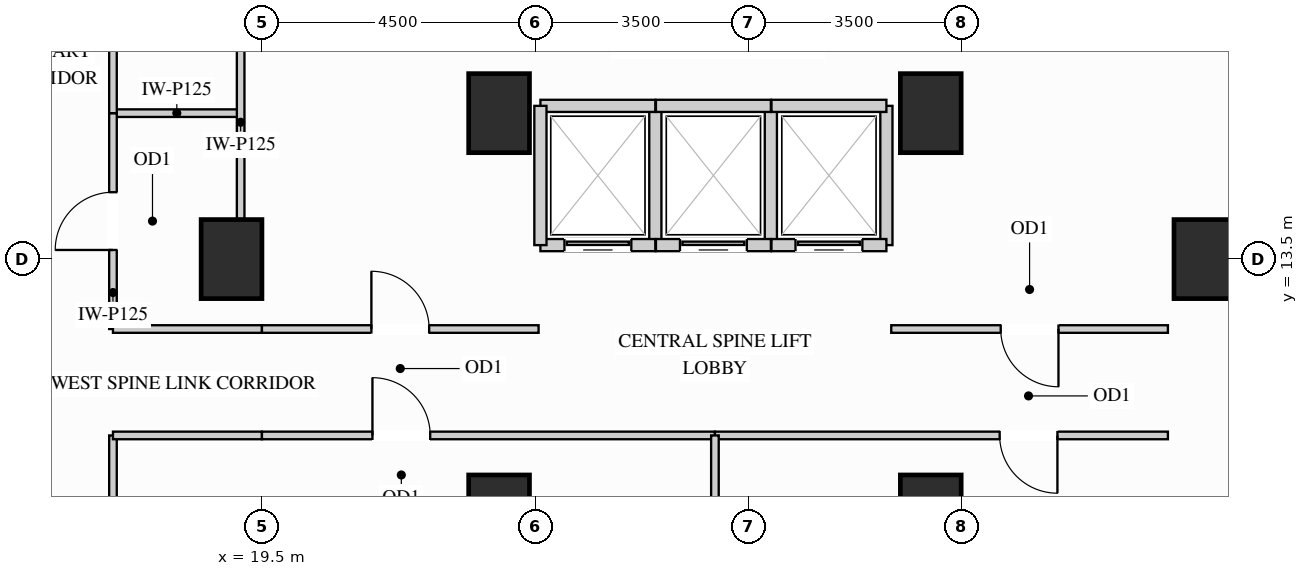
"""IFC4 building model, lengths in metres.
Left out: names, types, materials, properties, quantities, classifications, styles, units other than length and angle.
Written with IfcOpenShell. Run it as: python <this file> out.ifc"""

import sys

from ifc_helpers import new_model, si_unit, direction, frame, frame_2d, origin, origin_2d, place, context, subcontext, project, spatial, rectangle, extrude, source, transform, mapped, element, fill, save


model = new_model("IFC4")
c1 = context("Model", 3, precision=1e-05, world=origin(), true_north=direction((0.0, 1.0)))
c2 = subcontext(c1, "Body", "Model", "MODEL_VIEW")
j1 = project(units=[si_unit("LENGTHUNIT", "METRE"), si_unit("PLANEANGLEUNIT", "RADIAN")], contexts=[c1])
p1 = place(None, origin())
s1 = spatial("IfcSite", under=j1, at=p1, CompositionType="ELEMENT")
p2 = place(p1, origin())
s2 = spatial("IfcBuilding", under=s1, at=p2, CompositionType="ELEMENT")
p3 = place(p2, frame((0.0, 0.0, 40.5)))
s3 = spatial("IfcBuildingStorey", under=s2, at=p3, CompositionType="ELEMENT", Elevation=40.5)
m1 = source(origin(), c2, "Body", "SweptSolid", [
    extrude(rectangle(XDim=1.0, YDim=1.3, at=origin_2d()), origin(), (0.0, 0.0, 1.0), 3.38),
])
for number, where, z_axis, x_axis in (
    (1, (19.0, 13.5, 0.0), (0.0, 0.0, 1.0), (1.0, 0.0, 0.0)),
    (2, (35.0, 13.5, 0.0), (0.0, 0.0, 1.0), (1.0, 0.0, 0.0)),
    (3, (23.4, 15.9, 0.0), (0.0, 0.0, 1.0), (1.0, 0.0, 0.0)),
    (4, (23.4, 9.3, 0.0), (0.0, 0.0, 1.0), (1.0, 0.0, 0.0)),
    (5, (30.5, 15.9, 0.0), (0.0, 0.0, 1.0), (1.0, 0.0, 0.0)),
    (6, (30.5, 9.3, 0.0), (0.0, 0.0, 1.0), (1.0, 0.0, 0.0)),
):
    element("IfcColumn", number, at=place(p3, frame(where, z_axis=z_axis, x_axis=x_axis)), inside=s3, PredefinedType="COLUMN", context=c2, shape_type="MappedRepresentation", body=[
        mapped(m1, transform((0.0, 0.0, 0.0), x_axis=(1.0, 0.0, 0.0), y_axis=(0.0, 1.0, 0.0), z_axis=(0.0, 0.0, 1.0))),
    ])
m2 = source(origin(), c2, "Body", "SweptSolid", [
    extrude(rectangle(XDim=2.1, YDim=0.125, at=frame_2d((1.05, 0.0))), origin(), (0.0, 0.0, 1.0), 3.365),
])
p4 = place(p3, frame((17.05, 15.9, 0.0), z_axis=(0.0, 0.0, 1.0), x_axis=(1.0, 0.0, 0.0)))
e7 = element("IfcWall", 7, at=p4, inside=s3, PredefinedType="PARTITIONING", context=c2, shape_type="MappedRepresentation", body=[
    mapped(m2, transform((0.0, 0.0, 0.0), x_axis=(1.0, 0.0, 0.0), y_axis=(0.0, 1.0, 0.0), z_axis=(0.0, 0.0, 1.0))),
])
m3 = source(origin(), c2, "Body", "SweptSolid", [
    extrude(rectangle(XDim=3.18, YDim=0.125, at=frame_2d((1.59, 0.0))), origin(), (0.0, 0.0, 1.0), 2.67),
])
p5 = place(p3, frame((19.15, 14.16, 0.0), z_axis=(0.0, 0.0, 1.0), x_axis=(0.0, 1.0, 0.0)))
e8 = element("IfcWall", 8, at=p5, inside=s3, PredefinedType="PARTITIONING", context=c2, shape_type="MappedRepresentation", body=[
    mapped(m3, transform((0.0, 0.0, 0.0), x_axis=(1.0, 0.0, 0.0), y_axis=(0.0, 1.0, 0.0), z_axis=(0.0, 0.0, 1.0))),
])
p6 = place(p3, frame((17.05, 12.35, 0.0), z_axis=(0.0, 0.0, 1.0), x_axis=(0.0, 1.0, 0.0)))
e9 = element("IfcWall", 9, at=p6, inside=s3, PredefinedType="PARTITIONING", context=c2, shape_type="SweptSolid", body=[
    extrude(rectangle(XDim=3.55, YDim=0.125, at=frame_2d((1.775, 0.0))), origin(), (0.0, 0.0, 1.0), 3.365),
])
p7 = place(p6, frame((1.3, 0.0, 0.0)))
e10 = element("IfcOpeningElement", 10, at=p7, cuts=e9, PredefinedType="OPENING", context=c2, shape_type="SweptSolid", body=[
    extrude(rectangle(XDim=0.95, YDim=2.15, at=frame_2d((0.475, 1.075))), frame((0.0, 0.073, 0.0), z_axis=(0.0, -1.0, 0.0), x_axis=(1.0, 0.0, 0.0)), (0.0, 0.0, 1.0), 0.145),
])
p8 = place(p3, frame((17.05, 15.9, 0.0), z_axis=(0.0, 0.0, 1.0), x_axis=(0.0, 1.0, 0.0)))
e11 = element("IfcWall", 11, at=p8, inside=s3, PredefinedType="PARTITIONING", context=c2, shape_type="SweptSolid", body=[
    extrude(rectangle(XDim=7.45, YDim=0.125, at=frame_2d((3.725, 0.0))), origin(), (0.0, 0.0, 1.0), 3.365),
])
p9 = place(p8, frame((3.25, 0.0, 0.0)))
e12 = element("IfcOpeningElement", 12, at=p9, cuts=e11, PredefinedType="OPENING", context=c2, shape_type="SweptSolid", body=[
    extrude(rectangle(XDim=0.95, YDim=2.15, at=frame_2d((0.475, 1.075))), frame((0.0, 0.073, 0.0), z_axis=(0.0, -1.0, 0.0), x_axis=(1.0, 0.0, 0.0)), (0.0, 0.0, 1.0), 0.145),
])
p10 = place(p3, frame((17.05, 6.15, 0.0), z_axis=(0.0, 0.0, 1.0), x_axis=(0.0, 1.0, 0.0)))
e13 = element("IfcWall", 13, at=p10, inside=s3, PredefinedType="PARTITIONING", context=c2, shape_type="SweptSolid", body=[
    extrude(rectangle(XDim=4.45, YDim=0.125, at=frame_2d((2.225, 0.0))), origin(), (0.0, 0.0, 1.0), 3.365),
])
p11 = place(p10, frame((1.75, 0.0, 0.0)))
e14 = element("IfcOpeningElement", 14, at=p11, cuts=e13, PredefinedType="OPENING", context=c2, shape_type="SweptSolid", body=[
    extrude(rectangle(XDim=0.95, YDim=2.15, at=frame_2d((0.475, 1.075))), frame((0.0, 0.073, 0.0), z_axis=(0.0, -1.0, 0.0), x_axis=(1.0, 0.0, 0.0)), (0.0, 0.0, 1.0), 0.145),
])
p12 = place(p3, frame((29.85, 12.35, 0.0), z_axis=(0.0, 0.0, 1.0), x_axis=(1.0, 0.0, 0.0)))
e15 = element("IfcWall", 15, at=p12, inside=s3, PredefinedType="PARTITIONING", context=c2, shape_type="SweptSolid", body=[
    extrude(rectangle(XDim=4.55, YDim=0.125, at=frame_2d((2.275, 0.0))), origin(), (0.0, 0.0, 1.0), 3.365),
])
p13 = place(p12, frame((1.8, 0.0, 0.0)))
e16 = element("IfcOpeningElement", 16, at=p13, cuts=e15, PredefinedType="OPENING", context=c2, shape_type="SweptSolid", body=[
    extrude(rectangle(XDim=0.95, YDim=2.15, at=frame_2d((0.475, 1.075))), frame((0.0, 0.073, 0.0), z_axis=(0.0, -1.0, 0.0), x_axis=(1.0, 0.0, 0.0)), (0.0, 0.0, 1.0), 0.145),
])
m4 = source(origin(), c2, "Body", "SweptSolid", [
    extrude(rectangle(XDim=2.45, YDim=0.125, at=frame_2d((1.225, 0.0))), origin(), (0.0, 0.0, 1.0), 3.365),
])
p14 = place(p3, frame((17.05, 12.35, 0.0), z_axis=(0.0, 0.0, 1.0), x_axis=(1.0, 0.0, 0.0)))
e17 = element("IfcWall", 17, at=p14, inside=s3, PredefinedType="PARTITIONING", context=c2, shape_type="MappedRepresentation", body=[
    mapped(m4, transform((0.0, 0.0, 0.0), x_axis=(1.0, 0.0, 0.0), y_axis=(0.0, 1.0, 0.0), z_axis=(0.0, 0.0, 1.0))),
])
p15 = place(p3, frame((19.5, 12.35, 0.0), z_axis=(0.0, 0.0, 1.0), x_axis=(1.0, 0.0, 0.0)))
e18 = element("IfcWall", 18, at=p15, inside=s3, PredefinedType="PARTITIONING", context=c2, shape_type="SweptSolid", body=[
    extrude(rectangle(XDim=4.55, YDim=0.125, at=frame_2d((2.275, 0.0))), origin(), (0.0, 0.0, 1.0), 3.365),
])
p16 = place(p15, frame((1.8, 0.0, 0.0)))
e19 = element("IfcOpeningElement", 19, at=p16, cuts=e18, PredefinedType="OPENING", context=c2, shape_type="SweptSolid", body=[
    extrude(rectangle(XDim=0.95, YDim=2.15, at=frame_2d((0.475, 1.075))), frame((0.0, 0.073, 0.0), z_axis=(0.0, -1.0, 0.0), x_axis=(1.0, 0.0, 0.0)), (0.0, 0.0, 1.0), 0.145),
])
p17 = place(p3, frame((17.05, 10.6, 0.0), z_axis=(0.0, 0.0, 1.0), x_axis=(1.0, 0.0, 0.0)))
e20 = element("IfcWall", 20, at=p17, inside=s3, PredefinedType="PARTITIONING", context=c2, shape_type="MappedRepresentation", body=[
    mapped(m4, transform((0.0, 0.0, 0.0), x_axis=(1.0, 0.0, 0.0), y_axis=(0.0, 1.0, 0.0), z_axis=(0.0, 0.0, 1.0))),
])
p18 = place(p3, frame((19.5, 10.6, 0.0), z_axis=(0.0, 0.0, 1.0), x_axis=(1.0, 0.0, 0.0)))
e21 = element("IfcWall", 21, at=p18, inside=s3, PredefinedType="PARTITIONING", context=c2, shape_type="SweptSolid", body=[
    extrude(rectangle(XDim=7.45, YDim=0.125, at=frame_2d((3.725, 0.0))), origin(), (0.0, 0.0, 1.0), 3.365),
])
p19 = place(p18, frame((1.817, 0.0, 0.0)))
e22 = element("IfcOpeningElement", 22, at=p19, cuts=e21, PredefinedType="OPENING", context=c2, shape_type="SweptSolid", body=[
    extrude(rectangle(XDim=0.95, YDim=2.15, at=frame_2d((0.475, 1.075))), frame((0.0, 0.073, 0.0), z_axis=(0.0, -1.0, 0.0), x_axis=(1.0, 0.0, 0.0)), (0.0, 0.0, 1.0), 0.145),
])
p20 = place(p3, frame((26.95, 10.6, 0.0), z_axis=(0.0, 0.0, 1.0), x_axis=(1.0, 0.0, 0.0)))
e23 = element("IfcWall", 23, at=p20, inside=s3, PredefinedType="PARTITIONING", context=c2, shape_type="SweptSolid", body=[
    extrude(rectangle(XDim=7.45, YDim=0.125, at=frame_2d((3.725, 0.0))), origin(), (0.0, 0.0, 1.0), 3.365),
])
p21 = place(p20, frame((4.683, 0.0, 0.0)))
e24 = element("IfcOpeningElement", 24, at=p21, cuts=e23, PredefinedType="OPENING", context=c2, shape_type="SweptSolid", body=[
    extrude(rectangle(XDim=0.95, YDim=2.15, at=frame_2d((0.475, 1.075))), frame((0.0, 0.073, 0.0), z_axis=(0.0, -1.0, 0.0), x_axis=(1.0, 0.0, 0.0)), (0.0, 0.0, 1.0), 0.145),
])
m5 = source(origin(), c2, "Body", "SweptSolid", [
    extrude(rectangle(XDim=1.748, YDim=0.125, at=frame_2d((0.874, 0.0))), origin(), (0.0, 0.0, 1.0), 3.365),
])
p22 = place(p3, frame((26.95, 8.852, 0.0), z_axis=(0.0, 0.0, 1.0), x_axis=(0.0, 1.0, 0.0)))
e25 = element("IfcWall", 25, at=p22, inside=s3, PredefinedType="PARTITIONING", context=c2, shape_type="MappedRepresentation", body=[
    mapped(m5, transform((0.0, 0.0, 0.0), x_axis=(1.0, 0.0, 0.0), y_axis=(0.0, 1.0, 0.0), z_axis=(0.0, 0.0, 1.0))),
])
m6 = source(origin(), c2, "Body", "SweptSolid", [
    extrude(rectangle(XDim=2.29, YDim=0.2, at=frame_2d((1.145, 0.0))), origin(), (0.0, 0.0, 1.0), 3.365),
])
p23 = place(p3, frame((25.97, 13.73, 0.0), z_axis=(0.0, 0.0, 1.0), x_axis=(0.0, 1.0, 0.0)))
e26 = element("IfcWall", 26, at=p23, inside=s3, PredefinedType="PARTITIONING", context=c2, shape_type="MappedRepresentation", body=[
    mapped(m6, transform((0.0, 0.0, 0.0), x_axis=(1.0, 0.0, 0.0), y_axis=(0.0, 1.0, 0.0), z_axis=(0.0, 0.0, 1.0))),
])
m7 = source(origin(), c2, "Body", "SweptSolid", [
    extrude(rectangle(XDim=1.89, YDim=0.2, at=frame_2d((0.945, 0.0))), origin(), (0.0, 0.0, 1.0), 2.67),
])
p24 = place(p3, frame((24.08, 16.02, 0.0), z_axis=(0.0, 0.0, 1.0), x_axis=(1.0, 0.0, 0.0)))
e27 = element("IfcWall", 27, at=p24, inside=s3, PredefinedType="PARTITIONING", context=c2, shape_type="MappedRepresentation", body=[
    mapped(m7, transform((0.0, 0.0, 0.0), x_axis=(1.0, 0.0, 0.0), y_axis=(0.0, 1.0, 0.0), z_axis=(0.0, 0.0, 1.0))),
])
p25 = place(p3, frame((24.08, 13.73, 0.0), z_axis=(0.0, 0.0, 1.0), x_axis=(1.0, 0.0, 0.0)))
e28 = element("IfcWall", 28, at=p25, inside=s3, PredefinedType="PARTITIONING", context=c2, shape_type="SweptSolid", body=[
    extrude(rectangle(XDim=1.89, YDim=0.2, at=frame_2d((0.945, 0.0))), origin(), (0.0, 0.0, 1.0), 2.446),
])
p26 = place(p25, frame((0.395, 0.0, 0.0)))
e29 = element("IfcOpeningElement", 29, at=p26, cuts=e28, PredefinedType="OPENING", context=c2, shape_type="SweptSolid", body=[
    extrude(rectangle(XDim=1.1, YDim=2.2, at=frame_2d((0.55, 1.1))), frame((0.0, 0.11, 0.0), z_axis=(0.0, -1.0, 0.0), x_axis=(1.0, 0.0, 0.0)), (0.0, 0.0, 1.0), 0.22),
])
for number, where, z_axis, x_axis in (
    (30, (24.08, 13.73, 0.0), (0.0, 0.0, 1.0), (0.0, 1.0, 0.0)),
    (31, (27.87, 13.73, 0.0), (0.0, 0.0, 1.0), (0.0, 1.0, 0.0)),
):
    element("IfcWall", number, at=place(p3, frame(where, z_axis=z_axis, x_axis=x_axis)), inside=s3, PredefinedType="PARTITIONING", context=c2, shape_type="MappedRepresentation", body=[
        mapped(m6, transform((0.0, 0.0, 0.0), x_axis=(1.0, 0.0, 0.0), y_axis=(0.0, 1.0, 0.0), z_axis=(0.0, 0.0, 1.0))),
    ])
m8 = source(origin(), c2, "Body", "SweptSolid", [
    extrude(rectangle(XDim=1.89, YDim=0.2, at=frame_2d((0.945, 0.0))), origin(), (0.0, 0.0, 1.0), 2.67),
])
p27 = place(p3, frame((25.98, 16.02, 0.0), z_axis=(0.0, 0.0, 1.0), x_axis=(1.0, 0.0, 0.0)))
e32 = element("IfcWall", 32, at=p27, inside=s3, PredefinedType="PARTITIONING", context=c2, shape_type="MappedRepresentation", body=[
    mapped(m8, transform((0.0, 0.0, 0.0), x_axis=(1.0, 0.0, 0.0), y_axis=(0.0, 1.0, 0.0), z_axis=(0.0, 0.0, 1.0))),
])
p28 = place(p3, frame((25.98, 13.73, 0.0), z_axis=(0.0, 0.0, 1.0), x_axis=(1.0, 0.0, 0.0)))
e33 = element("IfcWall", 33, at=p28, inside=s3, PredefinedType="PARTITIONING", context=c2, shape_type="SweptSolid", body=[
    extrude(rectangle(XDim=1.89, YDim=0.2, at=frame_2d((0.945, 0.0))), origin(), (0.0, 0.0, 1.0), 2.446),
])
p29 = place(p28, frame((0.395, 0.0, 0.0)))
e34 = element("IfcOpeningElement", 34, at=p29, cuts=e33, PredefinedType="OPENING", context=c2, shape_type="SweptSolid", body=[
    extrude(rectangle(XDim=1.1, YDim=2.2, at=frame_2d((0.55, 1.1))), frame((0.0, 0.11, 0.0), z_axis=(0.0, -1.0, 0.0), x_axis=(1.0, 0.0, 0.0)), (0.0, 0.0, 1.0), 0.22),
])
p30 = place(p3, frame((29.77, 13.73, 0.0), z_axis=(0.0, 0.0, 1.0), x_axis=(0.0, 1.0, 0.0)))
e35 = element("IfcWall", 35, at=p30, inside=s3, PredefinedType="PARTITIONING", context=c2, shape_type="MappedRepresentation", body=[
    mapped(m6, transform((0.0, 0.0, 0.0), x_axis=(1.0, 0.0, 0.0), y_axis=(0.0, 1.0, 0.0), z_axis=(0.0, 0.0, 1.0))),
])
p31 = place(p3, frame((27.88, 16.02, 0.0), z_axis=(0.0, 0.0, 1.0), x_axis=(1.0, 0.0, 0.0)))
e36 = element("IfcWall", 36, at=p31, inside=s3, PredefinedType="PARTITIONING", context=c2, shape_type="MappedRepresentation", body=[
    mapped(m8, transform((0.0, 0.0, 0.0), x_axis=(1.0, 0.0, 0.0), y_axis=(0.0, 1.0, 0.0), z_axis=(0.0, 0.0, 1.0))),
])
p32 = place(p3, frame((27.88, 13.73, 0.0), z_axis=(0.0, 0.0, 1.0), x_axis=(1.0, 0.0, 0.0)))
e37 = element("IfcWall", 37, at=p32, inside=s3, PredefinedType="PARTITIONING", context=c2, shape_type="SweptSolid", body=[
    extrude(rectangle(XDim=1.89, YDim=0.2, at=frame_2d((0.945, 0.0))), origin(), (0.0, 0.0, 1.0), 2.446),
])
p33 = place(p32, frame((0.395, 0.0, 0.0)))
e38 = element("IfcOpeningElement", 38, at=p33, cuts=e37, PredefinedType="OPENING", context=c2, shape_type="SweptSolid", body=[
    extrude(rectangle(XDim=1.1, YDim=2.2, at=frame_2d((0.55, 1.1))), frame((0.0, 0.11, 0.0), z_axis=(0.0, -1.0, 0.0), x_axis=(1.0, 0.0, 0.0)), (0.0, 0.0, 1.0), 0.22),
])
m9 = source(origin(), c2, "Body", "SweptSolid", [
    extrude(rectangle(XDim=1.1, YDim=2.2, at=frame_2d((0.55, 1.1))), frame((0.0, 0.025, 0.0), z_axis=(0.0, -1.0, 0.0), x_axis=(1.0, 0.0, 0.0)), (0.0, 0.0, 1.0), 0.05),
])
p34 = place(p26, origin())
e39 = element("IfcDoor", 39, at=p34, inside=s3, OperationType="SLIDING_TO_LEFT", PredefinedType="DOOR", context=c2, shape_type="MappedRepresentation", body=[
    mapped(m9, transform((0.0, 0.0, 0.0), x_axis=(1.0, 0.0, 0.0), y_axis=(0.0, 1.0, 0.0), z_axis=(0.0, 0.0, 1.0))),
])
fill(e29, e39)
p35 = place(p29, origin())
e40 = element("IfcDoor", 40, at=p35, inside=s3, OperationType="SLIDING_TO_LEFT", PredefinedType="DOOR", context=c2, shape_type="MappedRepresentation", body=[
    mapped(m9, transform((0.0, 0.0, 0.0), x_axis=(1.0, 0.0, 0.0), y_axis=(0.0, 1.0, 0.0), z_axis=(0.0, 0.0, 1.0))),
])
fill(e34, e40)
p36 = place(p33, origin())
e41 = element("IfcDoor", 41, at=p36, inside=s3, OperationType="SLIDING_TO_LEFT", PredefinedType="DOOR", context=c2, shape_type="MappedRepresentation", body=[
    mapped(m9, transform((0.0, 0.0, 0.0), x_axis=(1.0, 0.0, 0.0), y_axis=(0.0, 1.0, 0.0), z_axis=(0.0, 0.0, 1.0))),
])
fill(e38, e41)
m10 = source(origin(), c2, "Body", "SweptSolid", [
    extrude(rectangle(XDim=0.95, YDim=2.15, at=frame_2d((0.475, 1.075))), frame((0.0, 0.025, 0.0), z_axis=(0.0, -1.0, 0.0), x_axis=(1.0, 0.0, 0.0)), (0.0, 0.0, 1.0), 0.05),
])
p37 = place(p7, origin())
e42 = element("IfcDoor", 42, at=p37, inside=s3, OperationType="SINGLE_SWING_LEFT", PredefinedType="DOOR", context=c2, shape_type="MappedRepresentation", body=[
    mapped(m10, transform((0.0, 0.0, 0.0), x_axis=(1.0, 0.0, 0.0), y_axis=(0.0, 1.0, 0.0), z_axis=(0.0, 0.0, 1.0))),
])
fill(e10, e42)
p38 = place(p16, origin())
e43 = element("IfcDoor", 43, at=p38, inside=s3, OperationType="SINGLE_SWING_LEFT", PredefinedType="DOOR", context=c2, shape_type="MappedRepresentation", body=[
    mapped(m10, transform((0.0, 0.0, 0.0), x_axis=(1.0, 0.0, 0.0), y_axis=(0.0, 1.0, 0.0), z_axis=(0.0, 0.0, 1.0))),
])
fill(e19, e43)
p39 = place(p13, origin())
e44 = element("IfcDoor", 44, at=p39, inside=s3, OperationType="SINGLE_SWING_RIGHT", PredefinedType="DOOR", context=c2, shape_type="MappedRepresentation", body=[
    mapped(m10, transform((0.0, 0.0, 0.0), x_axis=(1.0, 0.0, 0.0), y_axis=(0.0, 1.0, 0.0), z_axis=(0.0, 0.0, 1.0))),
])
fill(e16, e44)
p40 = place(p19, origin())
e45 = element("IfcDoor", 45, at=p40, inside=s3, OperationType="SINGLE_SWING_LEFT", PredefinedType="DOOR", context=c2, shape_type="MappedRepresentation", body=[
    mapped(m10, transform((0.0, 0.0, 0.0), x_axis=(1.0, 0.0, 0.0), y_axis=(0.0, 1.0, 0.0), z_axis=(0.0, 0.0, 1.0))),
])
fill(e22, e45)
p41 = place(p21, origin())
e46 = element("IfcDoor", 46, at=p41, inside=s3, OperationType="SINGLE_SWING_RIGHT", PredefinedType="DOOR", context=c2, shape_type="MappedRepresentation", body=[
    mapped(m10, transform((0.0, 0.0, 0.0), x_axis=(1.0, 0.0, 0.0), y_axis=(0.0, 1.0, 0.0), z_axis=(0.0, 0.0, 1.0))),
])
fill(e24, e46)
save(model, sys.argv[1])
